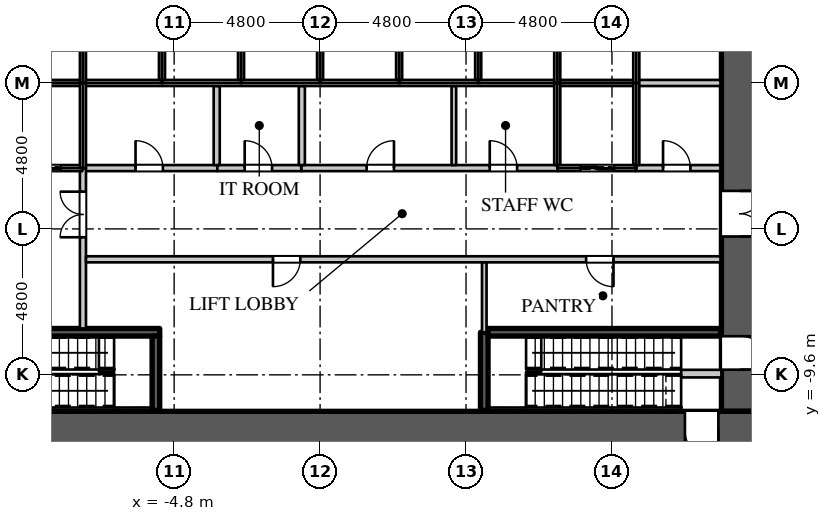
"""IFC4 building model, lengths in metres.
Left out: names, types, materials, properties, quantities, classifications, styles, units other than length and angle.
Written with IfcOpenShell. Run it as: python <this file> out.ifc"""

import sys

from ifc_helpers import new_model, si_unit, direction, frame, frame_2d, origin, place, context, subcontext, project, spatial, rectangle, extrude, element, fill, save


model = new_model("IFC4")
c1 = context("Model", 3, precision=1e-05, world=origin(), true_north=direction((0.0, 1.0)))
c2 = subcontext(c1, "Body", "Model", "MODEL_VIEW")
j1 = project(units=[si_unit("LENGTHUNIT", "METRE"), si_unit("PLANEANGLEUNIT", "RADIAN")], contexts=[c1])
p1 = place(None, origin())
s1 = spatial("IfcSite", under=j1, at=p1, CompositionType="ELEMENT")
p2 = place(p1, origin())
s2 = spatial("IfcBuilding", under=s1, at=p2, CompositionType="ELEMENT")
p3 = place(p2, origin())
s3 = spatial("IfcBuildingStorey", under=s2, at=p3, CompositionType="ELEMENT", Elevation=0.0)
p4 = place(p3, frame((-14.4, -11.4, 0.0), z_axis=(0.0, 0.0, 1.0), x_axis=(1.0, 0.0, 0.0)))
e1 = element("IfcWall", 1, at=p4, inside=s3, PredefinedType="SHEAR", context=c2, shape_type="SweptSolid", body=[
    extrude(rectangle(XDim=28.8, YDim=1.2, at=frame_2d((14.4, 0.0))), origin(), (0.0, 0.0, 1.0), 6.0),
])
p5 = place(p4, frame((1.3, 0.0, 0.0)))
e2 = element("IfcOpeningElement", 2, at=p5, cuts=e1, PredefinedType="OPENING", context=c2, shape_type="SweptSolid", body=[
    extrude(rectangle(XDim=1.1, YDim=2.2, at=frame_2d((0.55, 1.1))), frame((0.0, 0.61, 0.0), z_axis=(0.0, -1.0, 0.0), x_axis=(1.0, 0.0, 0.0)), (0.0, 0.0, 1.0), 1.22),
])
p6 = place(p4, frame((26.4, 0.0, 0.0)))
e3 = element("IfcOpeningElement", 3, at=p6, cuts=e1, PredefinedType="OPENING", context=c2, shape_type="SweptSolid", body=[
    extrude(rectangle(XDim=1.1, YDim=2.2, at=frame_2d((0.55, 1.1))), frame((0.0, 0.61, 0.0), z_axis=(0.0, -1.0, 0.0), x_axis=(1.0, 0.0, 0.0)), (0.0, 0.0, 1.0), 1.22),
])
p7 = place(p3, frame((13.8, -10.8, 0.0), z_axis=(0.0, 0.0, 1.0), x_axis=(0.0, 1.0, 0.0)))
e4 = element("IfcWall", 4, at=p7, inside=s3, PredefinedType="SHEAR", context=c2, shape_type="SweptSolid", body=[
    extrude(rectangle(XDim=21.6, YDim=1.2, at=frame_2d((10.8, 0.0))), origin(), (0.0, 0.0, 1.0), 6.0),
])
p8 = place(p7, frame((14.35, 0.0, 0.0)))
e5 = element("IfcOpeningElement", 5, at=p8, cuts=e4, PredefinedType="OPENING", context=c2, shape_type="SweptSolid", body=[
    extrude(rectangle(XDim=1.5, YDim=2.4, at=frame_2d((0.75, 1.2))), frame((0.0, 0.61, 0.0), z_axis=(0.0, -1.0, 0.0), x_axis=(1.0, 0.0, 0.0)), (0.0, 0.0, 1.0), 1.22),
])
p9 = place(p7, frame((5.75, 0.0, 0.0)))
e6 = element("IfcOpeningElement", 6, at=p9, cuts=e4, PredefinedType="OPENING", context=c2, shape_type="SweptSolid", body=[
    extrude(rectangle(XDim=1.5, YDim=2.4, at=frame_2d((0.75, 1.2))), frame((0.0, 0.61, 0.0), z_axis=(0.0, -1.0, 0.0), x_axis=(1.0, 0.0, 0.0)), (0.0, 0.0, 1.0), 1.22),
])
p10 = place(p7, frame((19.13, 0.0, 0.0)))
e7 = element("IfcOpeningElement", 7, at=p10, cuts=e4, PredefinedType="OPENING", context=c2, shape_type="SweptSolid", body=[
    extrude(rectangle(XDim=1.1, YDim=2.2, at=frame_2d((0.55, 1.1))), frame((0.0, 0.61, 0.0), z_axis=(0.0, -1.0, 0.0), x_axis=(1.0, 0.0, 0.0)), (0.0, 0.0, 1.0), 1.22),
])
p11 = place(p7, frame((1.37, 0.0, 0.0)))
e8 = element("IfcOpeningElement", 8, at=p11, cuts=e4, PredefinedType="OPENING", context=c2, shape_type="SweptSolid", body=[
    extrude(rectangle(XDim=1.1, YDim=2.2, at=frame_2d((0.55, 1.1))), frame((0.0, 0.61, 0.0), z_axis=(0.0, -1.0, 0.0), x_axis=(1.0, 0.0, 0.0)), (0.0, 0.0, 1.0), 1.22),
])
p12 = place(p3, frame((-7.82, -2.8, 0.0), z_axis=(0.0, 0.0, 1.0), x_axis=(1.0, 0.0, 0.0)))
e9 = element("IfcWall", 9, at=p12, inside=s3, PredefinedType="PARTITIONING", context=c2, shape_type="SweptSolid", body=[
    extrude(rectangle(XDim=4.44, YDim=0.2, at=frame_2d((2.22, 0.0))), origin(), (0.0, 0.0, 1.0), 5.65),
])
p13 = place(p12, frame((1.75, 0.0, 0.0)))
e10 = element("IfcOpeningElement", 10, at=p13, cuts=e9, PredefinedType="OPENING", context=c2, shape_type="SweptSolid", body=[
    extrude(rectangle(XDim=0.9, YDim=2.2, at=frame_2d((0.45, 1.1))), frame((0.0, 0.11, 0.0), z_axis=(0.0, -1.0, 0.0), x_axis=(1.0, 0.0, 0.0)), (0.0, 0.0, 1.0), 0.22),
])
p14 = place(p3, frame((-7.8, -8.075, 0.0), z_axis=(0.0, 0.0, 1.0), x_axis=(0.0, 1.0, 0.0)))
e11 = element("IfcWall", 11, at=p14, inside=s3, PredefinedType="PARTITIONING", context=c2, shape_type="SweptSolid", body=[
    extrude(rectangle(XDim=5.275, YDim=0.2, at=frame_2d((2.637, 0.0))), origin(), (0.0, 0.0, 1.0), 5.65),
])
p15 = place(p14, frame((3.0, 0.0, 0.0)))
e12 = element("IfcOpeningElement", 12, at=p15, cuts=e11, PredefinedType="OPENING", context=c2, shape_type="SweptSolid", body=[
    extrude(rectangle(XDim=1.5, YDim=2.4, at=frame_2d((0.75, 1.2))), frame((0.0, 0.11, 0.0), z_axis=(0.0, -1.0, 0.0), x_axis=(1.0, 0.0, 0.0)), (0.0, 0.0, 1.0), 0.22),
])
p16 = place(p3, frame((-7.7, -5.8, 0.0), z_axis=(0.0, 0.0, 1.0), x_axis=(1.0, 0.0, 0.0)))
e13 = element("IfcWall", 13, at=p16, inside=s3, PredefinedType="PARTITIONING", context=c2, shape_type="SweptSolid", body=[
    extrude(rectangle(XDim=20.87, YDim=0.2, at=frame_2d((10.435, 0.0))), origin(), (0.0, 0.0, 1.0), 5.65),
])
p17 = place(p16, frame((6.15, 0.0, 0.0)))
e14 = element("IfcOpeningElement", 14, at=p17, cuts=e13, PredefinedType="OPENING", context=c2, shape_type="SweptSolid", body=[
    extrude(rectangle(XDim=0.9, YDim=2.2, at=frame_2d((0.45, 1.1))), frame((0.0, 0.11, 0.0), z_axis=(0.0, -1.0, 0.0), x_axis=(1.0, 0.0, 0.0)), (0.0, 0.0, 1.0), 0.22),
])
p18 = place(p16, frame((16.45, 0.0, 0.0)))
e15 = element("IfcOpeningElement", 15, at=p18, cuts=e13, PredefinedType="OPENING", context=c2, shape_type="SweptSolid", body=[
    extrude(rectangle(XDim=0.9, YDim=2.2, at=frame_2d((0.45, 1.1))), frame((0.0, 0.11, 0.0), z_axis=(0.0, -1.0, 0.0), x_axis=(1.0, 0.0, 0.0)), (0.0, 0.0, 1.0), 0.22),
])
p19 = place(p3, frame((-0.62, -2.8, 0.0), z_axis=(0.0, 0.0, 1.0), x_axis=(1.0, 0.0, 0.0)))
e16 = element("IfcWall", 16, at=p19, inside=s3, PredefinedType="PARTITIONING", context=c2, shape_type="SweptSolid", body=[
    extrude(rectangle(XDim=8.44, YDim=0.2, at=frame_2d((4.22, 0.0))), origin(), (0.0, 0.0, 1.0), 5.65),
])
p20 = place(p19, frame((2.15, 0.0, 0.0)))
e17 = element("IfcOpeningElement", 17, at=p20, cuts=e16, PredefinedType="OPENING", context=c2, shape_type="SweptSolid", body=[
    extrude(rectangle(XDim=0.9, YDim=2.2, at=frame_2d((0.45, 1.1))), frame((0.0, 0.11, 0.0), z_axis=(0.0, -1.0, 0.0), x_axis=(1.0, 0.0, 0.0)), (0.0, 0.0, 1.0), 0.22),
])
p21 = place(p19, frame((6.2, 0.0, 0.0)))
e18 = element("IfcOpeningElement", 18, at=p21, cuts=e16, PredefinedType="OPENING", context=c2, shape_type="SweptSolid", body=[
    extrude(rectangle(XDim=0.9, YDim=2.2, at=frame_2d((0.45, 1.1))), frame((0.0, 0.11, 0.0), z_axis=(0.0, -1.0, 0.0), x_axis=(1.0, 0.0, 0.0)), (0.0, 0.0, 1.0), 0.22),
])
p22 = place(p3, frame((4.4, -2.7, 0.0), z_axis=(0.0, 0.0, 1.0), x_axis=(0.0, 1.0, 0.0)))
e19 = element("IfcWall", 19, at=p22, inside=s3, PredefinedType="PARTITIONING", context=c2, shape_type="SweptSolid", body=[
    extrude(rectangle(XDim=2.6, YDim=0.15, at=frame_2d((1.3, 0.0))), origin(), (0.0, 0.0, 1.0), 5.65),
])
p23 = place(p3, frame((5.4, -8.2, 0.0), z_axis=(0.0, 0.0, 1.0), x_axis=(0.0, 1.0, 0.0)))
e20 = element("IfcWall", 20, at=p23, inside=s3, PredefinedType="PARTITIONING", context=c2, shape_type="SweptSolid", body=[
    extrude(rectangle(XDim=2.3, YDim=0.15, at=frame_2d((1.15, 0.0))), origin(), (0.0, 0.0, 1.0), 5.65),
])
p24 = place(p3, frame((-3.38, -2.8, 0.0), z_axis=(0.0, 0.0, 1.0), x_axis=(1.0, 0.0, 0.0)))
e21 = element("IfcWall", 21, at=p24, inside=s3, PredefinedType="PARTITIONING", context=c2, shape_type="SweptSolid", body=[
    extrude(rectangle(XDim=2.76, YDim=0.2, at=frame_2d((1.38, 0.0))), origin(), (0.0, 0.0, 1.0), 5.65),
])
p25 = place(p24, frame((0.9, 0.0, 0.0)))
e22 = element("IfcOpeningElement", 22, at=p25, cuts=e21, PredefinedType="OPENING", context=c2, shape_type="SweptSolid", body=[
    extrude(rectangle(XDim=0.9, YDim=2.2, at=frame_2d((0.45, 1.1))), frame((0.0, 0.11, 0.0), z_axis=(0.0, -1.0, 0.0), x_axis=(1.0, 0.0, 0.0)), (0.0, 0.0, 1.0), 0.22),
])
for number, where, z_axis, x_axis in (
    (23, (-3.4, -2.7, 0.0), (0.0, 0.0, 1.0), (0.0, 1.0, 0.0)),
    (24, (-0.6, -2.7, 0.0), (0.0, 0.0, 1.0), (0.0, 1.0, 0.0)),
):
    element("IfcWall", number, at=place(p3, frame(where, z_axis=z_axis, x_axis=x_axis)), inside=s3, PredefinedType="PARTITIONING", context=c2, shape_type="SweptSolid", body=[
        extrude(rectangle(XDim=2.6, YDim=0.2, at=frame_2d((1.3, 0.0))), origin(), (0.0, 0.0, 1.0), 5.65),
    ])
p26 = place(p3, frame((10.38, -2.8, 0.0), z_axis=(0.0, 0.0, 1.0), x_axis=(1.0, 0.0, 0.0)))
e25 = element("IfcWall", 25, at=p26, inside=s3, PredefinedType="PARTITIONING", context=c2, shape_type="SweptSolid", body=[
    extrude(rectangle(XDim=2.79, YDim=0.2, at=frame_2d((1.395, 0.0))), origin(), (0.0, 0.0, 1.0), 5.65),
])
p27 = place(p26, frame((0.9, 0.0, 0.0)))
e26 = element("IfcOpeningElement", 26, at=p27, cuts=e25, PredefinedType="OPENING", context=c2, shape_type="SweptSolid", body=[
    extrude(rectangle(XDim=0.9, YDim=2.2, at=frame_2d((0.45, 1.1))), frame((0.0, 0.11, 0.0), z_axis=(0.0, -1.0, 0.0), x_axis=(1.0, 0.0, 0.0)), (0.0, 0.0, 1.0), 0.22),
])
p28 = place(p3, frame((10.4, 0.0, 0.0), z_axis=(0.0, 0.0, 1.0), x_axis=(1.0, 0.0, 0.0)))
e27 = element("IfcWall", 27, at=p28, inside=s3, PredefinedType="PARTITIONING", context=c2, shape_type="SweptSolid", body=[
    extrude(rectangle(XDim=2.77, YDim=0.2, at=frame_2d((1.385, 0.0))), origin(), (0.0, 0.0, 1.0), 5.65),
])
p29 = place(p3, frame((-13.17, 0.0, 0.0), z_axis=(0.0, 0.0, 1.0), x_axis=(1.0, 0.0, 0.0)))
e28 = element("IfcWall", 28, at=p29, inside=s3, PredefinedType="PARTITIONING", context=c2, shape_type="SweptSolid", body=[
    extrude(rectangle(XDim=23.57, YDim=0.2, at=frame_2d((11.785, 0.0))), origin(), (0.0, 0.0, 1.0), 5.65),
])
p30 = place(p3, frame((-10.38, -2.8, 0.0), z_axis=(0.0, 0.0, 1.0), x_axis=(1.0, 0.0, 0.0)))
e29 = element("IfcWall", 29, at=p30, inside=s3, PredefinedType="PARTITIONING", context=c2, shape_type="SweptSolid", body=[
    extrude(rectangle(XDim=2.56, YDim=0.2, at=frame_2d((1.28, 0.0))), origin(), (0.0, 0.0, 1.0), 5.65),
])
p31 = place(p30, frame((0.75, 0.0, 0.0)))
e30 = element("IfcOpeningElement", 30, at=p31, cuts=e29, PredefinedType="OPENING", context=c2, shape_type="SweptSolid", body=[
    extrude(rectangle(XDim=1.1, YDim=2.2, at=frame_2d((0.55, 1.1))), frame((0.0, 0.11, 0.0), z_axis=(0.0, -1.0, 0.0), x_axis=(1.0, 0.0, 0.0)), (0.0, 0.0, 1.0), 0.22),
])
for number, where, z_axis, x_axis in (
    (31, (-7.8, -2.8, 0.0), (0.0, 0.0, 1.0), (0.0, 1.0, 0.0)),
    (32, (-7.8, 0.0, 0.0), (0.0, 0.0, 1.0), (0.0, 1.0, 0.0)),
):
    element("IfcWall", number, at=place(p3, frame(where, z_axis=z_axis, x_axis=x_axis)), inside=s3, PredefinedType="PARTITIONING", context=c2, shape_type="SweptSolid", body=[
        extrude(rectangle(XDim=2.8, YDim=0.2, at=frame_2d((1.4, 0.0))), origin(), (0.0, 0.0, 1.0), 5.65),
    ])
for number, where, z_axis, x_axis in (
    (33, (-5.2, 0.1, 0.0), (0.0, 0.0, 1.0), (0.0, 1.0, 0.0)),
    (34, (-2.6, 0.1, 0.0), (0.0, 0.0, 1.0), (0.0, 1.0, 0.0)),
    (35, (0.0, 0.1, 0.0), (0.0, 0.0, 1.0), (0.0, 1.0, 0.0)),
    (36, (2.6, 0.1, 0.0), (0.0, 0.0, 1.0), (0.0, 1.0, 0.0)),
    (37, (5.2, 0.1, 0.0), (0.0, 0.0, 1.0), (0.0, 1.0, 0.0)),
):
    element("IfcWall", number, at=place(p3, frame(where, z_axis=z_axis, x_axis=x_axis)), inside=s3, PredefinedType="PARTITIONING", context=c2, shape_type="SweptSolid", body=[
        extrude(rectangle(XDim=2.6, YDim=0.2, at=frame_2d((1.3, 0.0))), origin(), (0.0, 0.0, 1.0), 5.65),
    ])
p32 = place(p3, frame((7.8, -2.7, 0.0), z_axis=(0.0, 0.0, 1.0), x_axis=(0.0, 1.0, 0.0)))
e38 = element("IfcWall", 38, at=p32, inside=s3, PredefinedType="PARTITIONING", context=c2, shape_type="SweptSolid", body=[
    extrude(rectangle(XDim=2.7, YDim=0.2, at=frame_2d((1.35, 0.0))), origin(), (0.0, 0.0, 1.0), 5.65),
])
p33 = place(p3, frame((7.82, -2.8, 0.0), z_axis=(0.0, 0.0, 1.0), x_axis=(1.0, 0.0, 0.0)))
e39 = element("IfcWall", 39, at=p33, inside=s3, PredefinedType="PARTITIONING", context=c2, shape_type="SweptSolid", body=[
    extrude(rectangle(XDim=2.56, YDim=0.2, at=frame_2d((1.28, 0.0))), origin(), (0.0, 0.0, 1.0), 5.65),
])
p34 = place(p33, frame((0.75, 0.0, 0.0)))
e40 = element("IfcOpeningElement", 40, at=p34, cuts=e39, PredefinedType="OPENING", context=c2, shape_type="SweptSolid", body=[
    extrude(rectangle(XDim=1.1, YDim=2.2, at=frame_2d((0.55, 1.1))), frame((0.0, 0.11, 0.0), z_axis=(0.0, -1.0, 0.0), x_axis=(1.0, 0.0, 0.0)), (0.0, 0.0, 1.0), 0.22),
])
p35 = place(p3, frame((7.8, 0.0, 0.0), z_axis=(0.0, 0.0, 1.0), x_axis=(0.0, 1.0, 0.0)))
e41 = element("IfcWall", 41, at=p35, inside=s3, PredefinedType="PARTITIONING", context=c2, shape_type="SweptSolid", body=[
    extrude(rectangle(XDim=2.7, YDim=0.2, at=frame_2d((1.35, 0.0))), origin(), (0.0, 0.0, 1.0), 5.65),
])
p36 = place(p3, frame((10.4, -2.7, 0.0), z_axis=(0.0, 0.0, 1.0), x_axis=(0.0, 1.0, 0.0)))
e42 = element("IfcWall", 42, at=p36, inside=s3, PredefinedType="PARTITIONING", context=c2, shape_type="SweptSolid", body=[
    extrude(rectangle(XDim=5.4, YDim=0.2, at=frame_2d((2.7, 0.0))), origin(), (0.0, 0.0, 1.0), 5.65),
])
p37 = place(p3, frame((-13.17, -8.2, 0.0), z_axis=(0.0, 0.0, 1.0), x_axis=(1.0, 0.0, 0.0)))
e43 = element("IfcWall", 43, at=p37, inside=s3, PredefinedType="SHEAR", context=c2, shape_type="SweptSolid", body=[
    extrude(rectangle(XDim=7.895, YDim=0.25, at=frame_2d((3.948, 0.0))), origin(), (0.0, 0.0, 1.0), 5.65),
])
p38 = place(p37, frame((0.15, 0.0, 0.0)))
e44 = element("IfcOpeningElement", 44, at=p38, cuts=e43, PredefinedType="OPENING", context=c2, shape_type="SweptSolid", body=[
    extrude(rectangle(XDim=1.1, YDim=2.2, at=frame_2d((0.55, 1.1))), frame((0.0, 0.135, 0.0), z_axis=(0.0, -1.0, 0.0), x_axis=(1.0, 0.0, 0.0)), (0.0, 0.0, 1.0), 0.27),
])
p39 = place(p3, frame((-5.4, -10.77, 0.0), z_axis=(0.0, 0.0, 1.0), x_axis=(0.0, 1.0, 0.0)))
e45 = element("IfcWall", 45, at=p39, inside=s3, PredefinedType="SHEAR", context=c2, shape_type="SweptSolid", body=[
    extrude(rectangle(XDim=2.445, YDim=0.25, at=frame_2d((1.223, 0.0))), origin(), (0.0, 0.0, 1.0), 5.65),
])
p40 = place(p3, frame((5.4, -10.77, 0.0), z_axis=(0.0, 0.0, 1.0), x_axis=(0.0, 1.0, 0.0)))
e46 = element("IfcWall", 46, at=p40, inside=s3, PredefinedType="SHEAR", context=c2, shape_type="SweptSolid", body=[
    extrude(rectangle(XDim=2.57, YDim=0.25, at=frame_2d((1.285, 0.0))), origin(), (0.0, 0.0, 1.0), 5.65),
])
p41 = place(p3, frame((5.525, -8.2, 0.0), z_axis=(0.0, 0.0, 1.0), x_axis=(1.0, 0.0, 0.0)))
e47 = element("IfcWall", 47, at=p41, inside=s3, PredefinedType="SHEAR", context=c2, shape_type="SweptSolid", body=[
    extrude(rectangle(XDim=7.645, YDim=0.25, at=frame_2d((3.823, 0.0))), origin(), (0.0, 0.0, 1.0), 5.65),
])
p42 = place(p3, frame((13.2, -9.56, 0.0), z_axis=(0.0, 0.0, 1.0), x_axis=(-1.0, 0.0, 0.0)))
e48 = element("IfcWall", 48, at=p42, inside=s3, PredefinedType="PARTITIONING", context=c2, shape_type="SweptSolid", body=[
    extrude(rectangle(XDim=1.325, YDim=0.25, at=frame_2d((0.663, 0.0))), origin(), (0.0, 0.0, 1.0), 5.65),
])
p43 = place(p27, origin())
e49 = element("IfcDoor", 49, at=p43, inside=s3, OperationType="SINGLE_SWING_LEFT", PredefinedType="DOOR", context=c2, shape_type="SweptSolid", body=[
    extrude(rectangle(XDim=0.9, YDim=2.2, at=frame_2d((0.45, 1.1))), frame((0.0, 0.025, 0.0), z_axis=(0.0, -1.0, 0.0), x_axis=(1.0, 0.0, 0.0)), (0.0, 0.0, 1.0), 0.05),
])
fill(e26, e49)
p44 = place(p17, origin())
e50 = element("IfcDoor", 50, at=p44, inside=s3, OperationType="SINGLE_SWING_RIGHT", PredefinedType="DOOR", context=c2, shape_type="SweptSolid", body=[
    extrude(rectangle(XDim=0.9, YDim=2.2, at=frame_2d((0.45, 1.1))), frame((0.0, 0.025, 0.0), z_axis=(0.0, -1.0, 0.0), x_axis=(1.0, 0.0, 0.0)), (0.0, 0.0, 1.0), 0.05),
])
fill(e14, e50)
p45 = place(p18, origin())
e51 = element("IfcDoor", 51, at=p45, inside=s3, OperationType="SINGLE_SWING_LEFT", PredefinedType="DOOR", context=c2, shape_type="SweptSolid", body=[
    extrude(rectangle(XDim=0.9, YDim=2.2, at=frame_2d((0.45, 1.1))), frame((0.0, 0.025, 0.0), z_axis=(0.0, -1.0, 0.0), x_axis=(1.0, 0.0, 0.0)), (0.0, 0.0, 1.0), 0.05),
])
fill(e15, e51)
p46 = place(p13, origin())
e52 = element("IfcDoor", 52, at=p46, inside=s3, OperationType="SINGLE_SWING_LEFT", PredefinedType="DOOR", context=c2, shape_type="SweptSolid", body=[
    extrude(rectangle(XDim=0.9, YDim=2.2, at=frame_2d((0.45, 1.1))), frame((0.0, 0.025, 0.0), z_axis=(0.0, -1.0, 0.0), x_axis=(1.0, 0.0, 0.0)), (0.0, 0.0, 1.0), 0.05),
])
fill(e10, e52)
p47 = place(p25, origin())
e53 = element("IfcDoor", 53, at=p47, inside=s3, OperationType="SINGLE_SWING_LEFT", PredefinedType="DOOR", context=c2, shape_type="SweptSolid", body=[
    extrude(rectangle(XDim=0.9, YDim=2.2, at=frame_2d((0.45, 1.1))), frame((0.0, 0.025, 0.0), z_axis=(0.0, -1.0, 0.0), x_axis=(1.0, 0.0, 0.0)), (0.0, 0.0, 1.0), 0.05),
])
fill(e22, e53)
p48 = place(p20, origin())
e54 = element("IfcDoor", 54, at=p48, inside=s3, OperationType="SINGLE_SWING_RIGHT", PredefinedType="DOOR", context=c2, shape_type="SweptSolid", body=[
    extrude(rectangle(XDim=0.9, YDim=2.2, at=frame_2d((0.45, 1.1))), frame((0.0, 0.025, 0.0), z_axis=(0.0, -1.0, 0.0), x_axis=(1.0, 0.0, 0.0)), (0.0, 0.0, 1.0), 0.05),
])
fill(e17, e54)
p49 = place(p21, origin())
e55 = element("IfcDoor", 55, at=p49, inside=s3, OperationType="SINGLE_SWING_LEFT", PredefinedType="DOOR", context=c2, shape_type="SweptSolid", body=[
    extrude(rectangle(XDim=0.9, YDim=2.2, at=frame_2d((0.45, 1.1))), frame((0.0, 0.025, 0.0), z_axis=(0.0, -1.0, 0.0), x_axis=(1.0, 0.0, 0.0)), (0.0, 0.0, 1.0), 0.05),
])
fill(e18, e55)
p50 = place(p31, origin())
e56 = element("IfcDoor", 56, at=p50, inside=s3, OperationType="DOUBLE_DOOR_SLIDING", PredefinedType="DOOR", context=c2, shape_type="SweptSolid", body=[
    extrude(rectangle(XDim=1.1, YDim=2.2, at=frame_2d((0.55, 1.1))), frame((0.0, 0.025, 0.0), z_axis=(0.0, -1.0, 0.0), x_axis=(1.0, 0.0, 0.0)), (0.0, 0.0, 1.0), 0.05),
])
fill(e30, e56)
p51 = place(p34, origin())
e57 = element("IfcDoor", 57, at=p51, inside=s3, OperationType="DOUBLE_DOOR_SLIDING", PredefinedType="DOOR", context=c2, shape_type="SweptSolid", body=[
    extrude(rectangle(XDim=1.1, YDim=2.2, at=frame_2d((0.55, 1.1))), frame((0.0, 0.025, 0.0), z_axis=(0.0, -1.0, 0.0), x_axis=(1.0, 0.0, 0.0)), (0.0, 0.0, 1.0), 0.05),
])
fill(e40, e57)
p52 = place(p15, origin())
e58 = element("IfcDoor", 58, at=p52, inside=s3, OperationType="DOUBLE_DOOR_SINGLE_SWING", PredefinedType="DOOR", context=c2, shape_type="SweptSolid", body=[
    extrude(rectangle(XDim=1.5, YDim=2.4, at=frame_2d((0.75, 1.2))), frame((0.0, 0.025, 0.0), z_axis=(0.0, -1.0, 0.0), x_axis=(1.0, 0.0, 0.0)), (0.0, 0.0, 1.0), 0.05),
])
fill(e12, e58)
p53 = place(p9, origin())
e59 = element("IfcDoor", 59, at=p53, inside=s3, OperationType="DOUBLE_DOOR_SINGLE_SWING", PredefinedType="DOOR", context=c2, shape_type="SweptSolid", body=[
    extrude(rectangle(XDim=1.5, YDim=2.4, at=frame_2d((0.75, 1.2))), frame((0.0, 0.025, 0.0), z_axis=(0.0, -1.0, 0.0), x_axis=(1.0, 0.0, 0.0)), (0.0, 0.0, 1.0), 0.05),
])
fill(e6, e59)
p54 = place(p6, origin())
e60 = element("IfcDoor", 60, at=p54, inside=s3, OperationType="SINGLE_SWING_LEFT", PredefinedType="DOOR", context=c2, shape_type="SweptSolid", body=[
    extrude(rectangle(XDim=1.1, YDim=2.2, at=frame_2d((0.55, 1.1))), frame((0.0, 0.025, 0.0), z_axis=(0.0, -1.0, 0.0), x_axis=(1.0, 0.0, 0.0)), (0.0, 0.0, 1.0), 0.05),
])
fill(e3, e60)
p55 = place(p11, origin())
e61 = element("IfcDoor", 61, at=p55, inside=s3, OperationType="SINGLE_SWING_RIGHT", PredefinedType="DOOR", context=c2, shape_type="SweptSolid", body=[
    extrude(rectangle(XDim=1.1, YDim=2.2, at=frame_2d((0.55, 1.1))), frame((0.0, 0.025, 0.0), z_axis=(0.0, -1.0, 0.0), x_axis=(1.0, 0.0, 0.0)), (0.0, 0.0, 1.0), 0.05),
])
fill(e8, e61)
save(model, sys.argv[1])
